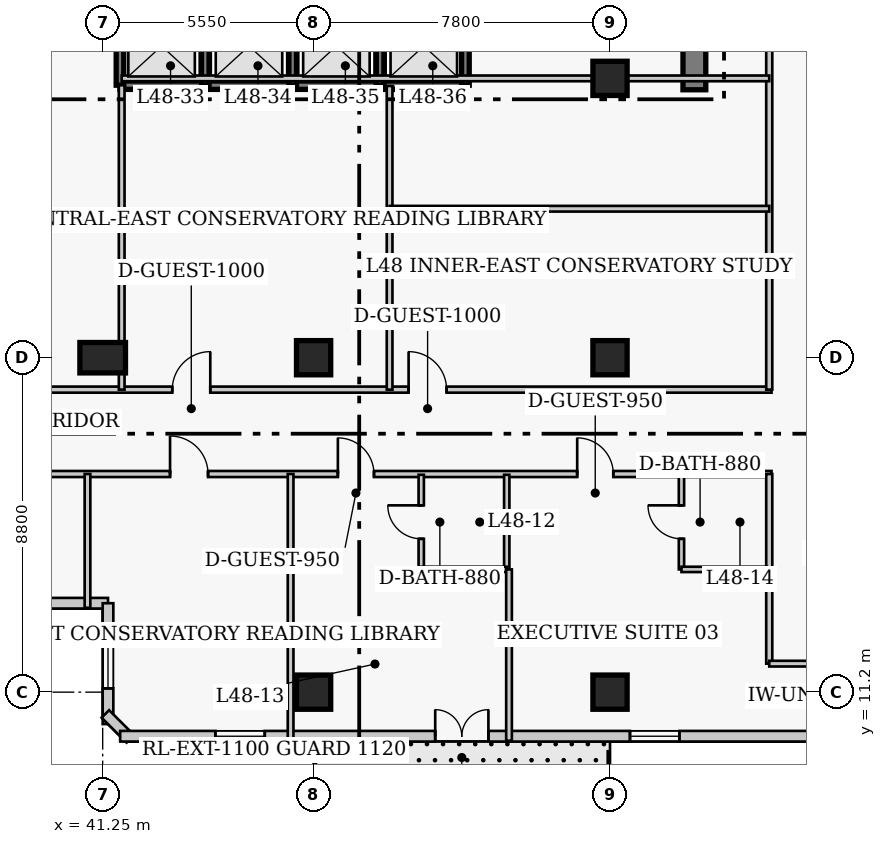
"""IFC4 building model, lengths in metres.
Left out: names, types, materials, properties, quantities, classifications, styles, units other than length and angle.
Written with IfcOpenShell. Run it as: python <this file> out.ifc"""

import sys

from ifc_helpers import new_model, si_unit, direction, frame, frame_2d, origin, origin_2d, place, context, subcontext, project, spatial, rectangle, extrude, element, fill, save


model = new_model("IFC4")
c1 = context("Model", 3, precision=1e-05, world=origin(), true_north=direction((0.0, 1.0)))
c2 = subcontext(c1, "Body", "Model", "MODEL_VIEW")
j1 = project(units=[si_unit("LENGTHUNIT", "METRE"), si_unit("PLANEANGLEUNIT", "RADIAN")], contexts=[c1])
p1 = place(None, origin())
s1 = spatial("IfcSite", under=j1, at=p1, CompositionType="ELEMENT")
p2 = place(p1, origin())
s2 = spatial("IfcBuilding", under=s1, at=p2, CompositionType="ELEMENT")
p3 = place(p2, frame((0.0, 0.0, 192.9)))
s3 = spatial("IfcBuildingStorey", under=s2, at=p3, CompositionType="ELEMENT", Elevation=192.9)
p4 = place(p3, frame((56.82, 27.05, 0.0), z_axis=(0.0, 0.0, 1.0), x_axis=(0.0, 1.0, 0.0)))
e1 = element("IfcWall", 1, at=p4, inside=s3, PredefinedType="SHEAR", context=c2, shape_type="SweptSolid", body=[
    extrude(rectangle(XDim=13.57, YDim=0.6, at=frame_2d((6.785, 0.0))), origin(), (0.0, 0.0, 1.0), 3.9),
])
p5 = place(p3, frame((41.25, 20.0, 0.0), z_axis=(0.0, 0.0, 1.0), x_axis=(1.0, 0.0, 0.0)))
e2 = element("IfcColumn", 2, at=p5, inside=s3, PredefinedType="COLUMN", context=c2, shape_type="SweptSolid", body=[
    extrude(rectangle(XDim=1.2, YDim=0.8, at=origin_2d()), origin(), (0.0, 0.0, 1.0), 3.9),
])
for number, where, z_axis, x_axis in (
    (3, (46.8, 11.2, 0.0), (0.0, 0.0, 1.0), (1.0, 0.0, 0.0)),
    (4, (46.8, 20.0, 0.0), (0.0, 0.0, 1.0), (1.0, 0.0, 0.0)),
    (5, (54.6, 11.2, 0.0), (0.0, 0.0, 1.0), (1.0, 0.0, 0.0)),
    (6, (54.6, 20.0, 0.0), (0.0, 0.0, 1.0), (1.0, 0.0, 0.0)),
    (7, (54.6, 27.35, 0.0), (0.0, 0.0, 1.0), (1.0, 0.0, 0.0)),
):
    element("IfcColumn", number, at=place(p3, frame(where, z_axis=z_axis, x_axis=x_axis)), inside=s3, PredefinedType="COLUMN", context=c2, shape_type="SweptSolid", body=[
        extrude(rectangle(XDim=0.9, YDim=0.9, at=origin_2d()), origin(), (0.0, 0.0, 1.0), 3.9),
    ])
p6 = place(p3, frame((36.61, 13.54, 0.0), z_axis=(0.0, 0.0, 1.0), x_axis=(1.0, 0.0, 0.0)))
e8 = element("IfcWall", 8, at=p6, inside=s3, PredefinedType="SOLIDWALL", context=c2, shape_type="SweptSolid", body=[
    extrude(rectangle(XDim=4.78, YDim=0.28, at=frame_2d((2.39, 0.0))), origin(), (0.0, 0.0, 1.0), 3.65),
])
p7 = place(p6, frame((1.74, 0.0, 0.85)))
e9 = element("IfcOpeningElement", 9, at=p7, cuts=e8, PredefinedType="OPENING", context=c2, shape_type="SweptSolid", body=[
    extrude(rectangle(XDim=1.3, YDim=1.7, at=frame_2d((0.65, 0.85))), frame((0.0, 0.15, 0.0), z_axis=(0.0, -1.0, 0.0), x_axis=(1.0, 0.0, 0.0)), (0.0, 0.0, 1.0), 0.3),
])
p8 = place(p3, frame((41.39, 13.54, 0.0), z_axis=(0.0, 0.0, 1.0), x_axis=(0.0, -1.0, 0.0)))
e10 = element("IfcWall", 10, at=p8, inside=s3, PredefinedType="SOLIDWALL", context=c2, shape_type="SweptSolid", body=[
    extrude(rectangle(XDim=3.18, YDim=0.28, at=frame_2d((1.59, 0.0))), origin(), (0.0, 0.0, 1.0), 3.65),
])
p9 = place(p8, frame((0.94, 0.0, 0.85)))
e11 = element("IfcOpeningElement", 11, at=p9, cuts=e10, PredefinedType="OPENING", context=c2, shape_type="SweptSolid", body=[
    extrude(rectangle(XDim=1.3, YDim=1.7, at=frame_2d((0.65, 0.85))), frame((0.0, 0.15, 0.0), z_axis=(0.0, -1.0, 0.0), x_axis=(1.0, 0.0, 0.0)), (0.0, 0.0, 1.0), 0.3),
])
p10 = place(p3, frame((41.321, 10.627, 0.0), z_axis=(0.0, 0.0, 1.0), x_axis=(0.707106781187, -0.707106781187, 0.0)))
e12 = element("IfcWall", 12, at=p10, inside=s3, PredefinedType="SOLIDWALL", context=c2, shape_type="SweptSolid", body=[
    extrude(rectangle(XDim=0.928, YDim=0.28, at=frame_2d((0.464, 0.0))), origin(), (0.0, 0.0, 1.0), 3.65),
])
p11 = place(p3, frame((41.71, 10.04, 0.0), z_axis=(0.0, 0.0, 1.0), x_axis=(1.0, 0.0, 0.0)))
e13 = element("IfcWall", 13, at=p11, inside=s3, PredefinedType="SOLIDWALL", context=c2, shape_type="SweptSolid", body=[
    extrude(rectangle(XDim=25.83, YDim=0.28, at=frame_2d((12.915, 0.0))), origin(), (0.0, 0.0, 1.0), 3.65),
])
p12 = place(p11, frame((8.29, 0.0, 0.0)))
e14 = element("IfcOpeningElement", 14, at=p12, cuts=e13, PredefinedType="OPENING", context=c2, shape_type="SweptSolid", body=[
    extrude(rectangle(XDim=1.4, YDim=2.15, at=frame_2d((0.7, 1.075))), frame((0.0, 0.15, 0.0), z_axis=(0.0, -1.0, 0.0), x_axis=(1.0, 0.0, 0.0)), (0.0, 0.0, 1.0), 0.3),
])
p13 = place(p11, frame((2.505, 0.0, 0.85)))
e15 = element("IfcOpeningElement", 15, at=p13, cuts=e13, PredefinedType="OPENING", context=c2, shape_type="SweptSolid", body=[
    extrude(rectangle(XDim=1.3, YDim=1.7, at=frame_2d((0.65, 0.85))), frame((0.0, 0.15, 0.0), z_axis=(0.0, -1.0, 0.0), x_axis=(1.0, 0.0, 0.0)), (0.0, 0.0, 1.0), 0.3),
])
p14 = place(p11, frame((13.415, 0.0, 0.85)))
e16 = element("IfcOpeningElement", 16, at=p14, cuts=e13, PredefinedType="OPENING", context=c2, shape_type="SweptSolid", body=[
    extrude(rectangle(XDim=1.3, YDim=1.7, at=frame_2d((0.65, 0.85))), frame((0.0, 0.15, 0.0), z_axis=(0.0, -1.0, 0.0), x_axis=(1.0, 0.0, 0.0)), (0.0, 0.0, 1.0), 0.3),
])
p15 = place(p11, frame((21.525, 0.0, 0.85)))
e17 = element("IfcOpeningElement", 17, at=p15, cuts=e13, PredefinedType="OPENING", context=c2, shape_type="SweptSolid", body=[
    extrude(rectangle(XDim=1.3, YDim=1.7, at=frame_2d((0.65, 0.85))), frame((0.0, 0.15, 0.0), z_axis=(0.0, -1.0, 0.0), x_axis=(1.0, 0.0, 0.0)), (0.0, 0.0, 1.0), 0.3),
])
p16 = place(p3, frame((41.705, 27.17, 0.0), z_axis=(0.0, 0.0, 1.0), x_axis=(1.0, 0.0, 0.0)))
e18 = element("IfcWall", 18, at=p16, inside=s3, PredefinedType="SHEAR", context=c2, shape_type="SweptSolid", body=[
    extrude(rectangle(XDim=2.245, YDim=0.22, at=frame_2d((1.123, 0.0))), origin(), (0.0, 0.0, 1.0), 3.9),
])
p17 = place(p3, frame((41.705, 27.17, 0.0), z_axis=(0.0, 0.0, 1.0), x_axis=(0.0, 1.0, 0.0)))
e19 = element("IfcWall", 19, at=p17, inside=s3, PredefinedType="SHEAR", context=c2, shape_type="SweptSolid", body=[
    extrude(rectangle(XDim=2.06, YDim=0.2, at=frame_2d((1.03, 0.0))), origin(), (0.0, 0.0, 1.0), 3.9),
])
p18 = place(p3, frame((43.95, 27.17, 0.0), z_axis=(0.0, 0.0, 1.0), x_axis=(1.0, 0.0, 0.0)))
e20 = element("IfcWall", 20, at=p18, inside=s3, PredefinedType="SHEAR", context=c2, shape_type="SweptSolid", body=[
    extrude(rectangle(XDim=2.3, YDim=0.22, at=frame_2d((1.15, 0.0))), origin(), (0.0, 0.0, 1.0), 3.9),
])
p19 = place(p3, frame((43.95, 27.17, 0.0), z_axis=(0.0, 0.0, 1.0), x_axis=(0.0, 1.0, 0.0)))
e21 = element("IfcWall", 21, at=p19, inside=s3, PredefinedType="SHEAR", context=c2, shape_type="SweptSolid", body=[
    extrude(rectangle(XDim=2.06, YDim=0.2, at=frame_2d((1.03, 0.0))), origin(), (0.0, 0.0, 1.0), 3.9),
])
p20 = place(p3, frame((46.25, 27.17, 0.0), z_axis=(0.0, 0.0, 1.0), x_axis=(1.0, 0.0, 0.0)))
e22 = element("IfcWall", 22, at=p20, inside=s3, PredefinedType="SHEAR", context=c2, shape_type="SweptSolid", body=[
    extrude(rectangle(XDim=2.3, YDim=0.22, at=frame_2d((1.15, 0.0))), origin(), (0.0, 0.0, 1.0), 3.9),
])
p21 = place(p3, frame((46.25, 27.17, 0.0), z_axis=(0.0, 0.0, 1.0), x_axis=(0.0, 1.0, 0.0)))
e23 = element("IfcWall", 23, at=p21, inside=s3, PredefinedType="SHEAR", context=c2, shape_type="SweptSolid", body=[
    extrude(rectangle(XDim=2.06, YDim=0.2, at=frame_2d((1.03, 0.0))), origin(), (0.0, 0.0, 1.0), 3.9),
])
p22 = place(p3, frame((48.55, 27.17, 0.0), z_axis=(0.0, 0.0, 1.0), x_axis=(1.0, 0.0, 0.0)))
e24 = element("IfcWall", 24, at=p22, inside=s3, PredefinedType="SHEAR", context=c2, shape_type="SweptSolid", body=[
    extrude(rectangle(XDim=2.245, YDim=0.22, at=frame_2d((1.123, 0.0))), origin(), (0.0, 0.0, 1.0), 3.9),
])
for number, where, z_axis, x_axis in (
    (25, (48.55, 27.17, 0.0), (0.0, 0.0, 1.0), (0.0, 1.0, 0.0)),
    (26, (50.795, 27.17, 0.0), (0.0, 0.0, 1.0), (0.0, 1.0, 0.0)),
):
    element("IfcWall", number, at=place(p3, frame(where, z_axis=z_axis, x_axis=x_axis)), inside=s3, PredefinedType="SHEAR", context=c2, shape_type="SweptSolid", body=[
        extrude(rectangle(XDim=2.06, YDim=0.2, at=frame_2d((1.03, 0.0))), origin(), (0.0, 0.0, 1.0), 3.9),
    ])
p23 = place(p3, frame((35.85, 19.16, 0.0), z_axis=(0.0, 0.0, 1.0), x_axis=(1.0, 0.0, 0.0)))
e27 = element("IfcWall", 27, at=p23, inside=s3, PredefinedType="PARTITIONING", context=c2, shape_type="SweptSolid", body=[
    extrude(rectangle(XDim=23.0, YDim=0.16, at=frame_2d((11.5, 0.0))), origin(), (0.0, 0.0, 1.0), 3.65),
])
p24 = place(p23, frame((7.231, 0.0, 0.0)))
e28 = element("IfcOpeningElement", 28, at=p24, cuts=e27, PredefinedType="OPENING", context=c2, shape_type="SweptSolid", body=[
    extrude(rectangle(XDim=1.0, YDim=2.15, at=frame_2d((0.5, 1.075))), frame((0.0, 0.09, 0.0), z_axis=(0.0, -1.0, 0.0), x_axis=(1.0, 0.0, 0.0)), (0.0, 0.0, 1.0), 0.18),
])
p25 = place(p23, frame((13.45, 0.0, 0.0)))
e29 = element("IfcOpeningElement", 29, at=p25, cuts=e27, PredefinedType="OPENING", context=c2, shape_type="SweptSolid", body=[
    extrude(rectangle(XDim=1.0, YDim=2.15, at=frame_2d((0.5, 1.075))), frame((0.0, 0.09, 0.0), z_axis=(0.0, -1.0, 0.0), x_axis=(1.0, 0.0, 0.0)), (0.0, 0.0, 1.0), 0.18),
])
p26 = place(p3, frame((35.8, 16.94, 0.0), z_axis=(0.0, 0.0, 1.0), x_axis=(1.0, 0.0, 0.0)))
e30 = element("IfcWall", 30, at=p26, inside=s3, PredefinedType="PARTITIONING", context=c2, shape_type="SweptSolid", body=[
    extrude(rectangle(XDim=23.05, YDim=0.16, at=frame_2d((11.525, 0.0))), origin(), (0.0, 0.0, 1.0), 3.65),
])
p27 = place(p26, frame((7.222, 0.0, 0.0)))
e31 = element("IfcOpeningElement", 31, at=p27, cuts=e30, PredefinedType="OPENING", context=c2, shape_type="SweptSolid", body=[
    extrude(rectangle(XDim=1.0, YDim=2.15, at=frame_2d((0.5, 1.075))), frame((0.0, 0.09, 0.0), z_axis=(0.0, -1.0, 0.0), x_axis=(1.0, 0.0, 0.0)), (0.0, 0.0, 1.0), 0.18),
])
p28 = place(p26, frame((11.639, 0.0, 0.0)))
e32 = element("IfcOpeningElement", 32, at=p28, cuts=e30, PredefinedType="OPENING", context=c2, shape_type="SweptSolid", body=[
    extrude(rectangle(XDim=0.95, YDim=2.1, at=frame_2d((0.475, 1.05))), frame((0.0, 0.09, 0.0), z_axis=(0.0, -1.0, 0.0), x_axis=(1.0, 0.0, 0.0)), (0.0, 0.0, 1.0), 0.18),
])
p29 = place(p26, frame((17.936, 0.0, 0.0)))
e33 = element("IfcOpeningElement", 33, at=p29, cuts=e30, PredefinedType="OPENING", context=c2, shape_type="SweptSolid", body=[
    extrude(rectangle(XDim=0.95, YDim=2.1, at=frame_2d((0.475, 1.05))), frame((0.0, 0.09, 0.0), z_axis=(0.0, -1.0, 0.0), x_axis=(1.0, 0.0, 0.0)), (0.0, 0.0, 1.0), 0.18),
])
p30 = place(p3, frame((58.79, 19.16, 0.0), z_axis=(0.0, 0.0, 1.0), x_axis=(0.0, 1.0, 0.0)))
e34 = element("IfcWall", 34, at=p30, inside=s3, PredefinedType="PARTITIONING", context=c2, shape_type="SweptSolid", body=[
    extrude(rectangle(XDim=21.49, YDim=0.16, at=frame_2d((10.745, 0.0))), origin(), (0.0, 0.0, 1.0), 3.65),
])
p31 = place(p3, frame((58.79, 11.95, 0.0), z_axis=(0.0, 0.0, 1.0), x_axis=(0.0, 1.0, 0.0)))
e35 = element("IfcWall", 35, at=p31, inside=s3, PredefinedType="PARTITIONING", context=c2, shape_type="SweptSolid", body=[
    extrude(rectangle(XDim=4.99, YDim=0.16, at=frame_2d((2.495, 0.0))), origin(), (0.0, 0.0, 1.0), 3.65),
])
p32 = place(p3, frame((58.79, 11.95, 0.0), z_axis=(0.0, 0.0, 1.0), x_axis=(1.0, 0.0, 0.0)))
e36 = element("IfcWall", 36, at=p32, inside=s3, PredefinedType="PARTITIONING", context=c2, shape_type="SweptSolid", body=[
    extrude(rectangle(XDim=2.22, YDim=0.15, at=frame_2d((1.11, 0.0))), origin(), (0.0, 0.0, 1.0), 3.65),
])
p33 = place(p3, frame((41.75, 19.16, 0.0), z_axis=(0.0, 0.0, 1.0), x_axis=(0.0, 1.0, 0.0)))
e37 = element("IfcWall", 37, at=p33, inside=s3, PredefinedType="PARTITIONING", context=c2, shape_type="SweptSolid", body=[
    extrude(rectangle(XDim=8.01, YDim=0.15, at=frame_2d((4.005, 0.0))), origin(), (0.0, 0.0, 1.0), 3.65),
])
p34 = place(p3, frame((48.8, 19.16, 0.0), z_axis=(0.0, 0.0, 1.0), x_axis=(0.0, 1.0, 0.0)))
e38 = element("IfcWall", 38, at=p34, inside=s3, PredefinedType="PARTITIONING", context=c2, shape_type="SweptSolid", body=[
    extrude(rectangle(XDim=7.99, YDim=0.15, at=frame_2d((3.995, 0.0))), origin(), (0.0, 0.0, 1.0), 3.65),
])
p35 = place(p3, frame((41.75, 27.35, 0.0), z_axis=(0.0, 0.0, 1.0), x_axis=(1.0, 0.0, 0.0)))
e39 = element("IfcWall", 39, at=p35, inside=s3, PredefinedType="PARTITIONING", context=c2, shape_type="SweptSolid", body=[
    extrude(rectangle(XDim=17.04, YDim=0.15, at=frame_2d((8.52, 0.0))), origin(), (0.0, 0.0, 1.0), 3.65),
])
p36 = place(p3, frame((48.8, 23.92, 0.0), z_axis=(0.0, 0.0, 1.0), x_axis=(1.0, 0.0, 0.0)))
e40 = element("IfcWall", 40, at=p36, inside=s3, PredefinedType="PARTITIONING", context=c2, shape_type="SweptSolid", body=[
    extrude(rectangle(XDim=9.99, YDim=0.15, at=frame_2d((4.995, 0.0))), origin(), (0.0, 0.0, 1.0), 3.65),
])
p37 = place(p3, frame((40.85, 13.42, 0.0), z_axis=(0.0, 0.0, 1.0), x_axis=(0.0, 1.0, 0.0)))
e41 = element("IfcWall", 41, at=p37, inside=s3, PredefinedType="PARTITIONING", context=c2, shape_type="SweptSolid", body=[
    extrude(rectangle(XDim=3.52, YDim=0.15, at=frame_2d((1.76, 0.0))), origin(), (0.0, 0.0, 1.0), 3.65),
])
p38 = place(p3, frame((46.195, 9.92, 0.0), z_axis=(0.0, 0.0, 1.0), x_axis=(0.0, 1.0, 0.0)))
e42 = element("IfcWall", 42, at=p38, inside=s3, PredefinedType="PARTITIONING", context=c2, shape_type="SweptSolid", body=[
    extrude(rectangle(XDim=7.02, YDim=0.15, at=frame_2d((3.51, 0.0))), origin(), (0.0, 0.0, 1.0), 3.65),
])
p39 = place(p3, frame((49.633, 14.43, 0.0), z_axis=(0.0, 0.0, 1.0), x_axis=(0.0, 1.0, 0.0)))
e43 = element("IfcWall", 43, at=p39, inside=s3, PredefinedType="PLUMBINGWALL", context=c2, shape_type="SweptSolid", body=[
    extrude(rectangle(XDim=2.49, YDim=0.14, at=frame_2d((1.245, 0.0))), origin(), (0.0, 0.0, 1.0), 3.65),
])
p40 = place(p39, frame((0.805, 0.0, 0.0)))
e44 = element("IfcOpeningElement", 44, at=p40, cuts=e43, PredefinedType="OPENING", context=c2, shape_type="SweptSolid", body=[
    extrude(rectangle(XDim=0.88, YDim=2.05, at=frame_2d((0.44, 1.025))), frame((0.0, 0.08, 0.0), z_axis=(0.0, -1.0, 0.0), x_axis=(1.0, 0.0, 0.0)), (0.0, 0.0, 1.0), 0.16),
])
p41 = place(p3, frame((51.883, 14.43, 0.0), z_axis=(0.0, 0.0, 1.0), x_axis=(0.0, 1.0, 0.0)))
e45 = element("IfcWall", 45, at=p41, inside=s3, PredefinedType="PLUMBINGWALL", context=c2, shape_type="SweptSolid", body=[
    extrude(rectangle(XDim=2.49, YDim=0.14, at=frame_2d((1.245, 0.0))), origin(), (0.0, 0.0, 1.0), 3.65),
])
p42 = place(p3, frame((49.633, 14.43, 0.0), z_axis=(0.0, 0.0, 1.0), x_axis=(1.0, 0.0, 0.0)))
e46 = element("IfcWall", 46, at=p42, inside=s3, PredefinedType="PLUMBINGWALL", context=c2, shape_type="SweptSolid", body=[
    extrude(rectangle(XDim=2.25, YDim=0.14, at=frame_2d((1.125, 0.0))), origin(), (0.0, 0.0, 1.0), 3.65),
])
p43 = place(p3, frame((51.942, 9.92, 0.0), z_axis=(0.0, 0.0, 1.0), x_axis=(0.0, 1.0, 0.0)))
e47 = element("IfcWall", 47, at=p43, inside=s3, PredefinedType="PARTITIONING", context=c2, shape_type="SweptSolid", body=[
    extrude(rectangle(XDim=4.51, YDim=0.15, at=frame_2d((2.255, 0.0))), origin(), (0.0, 0.0, 1.0), 3.65),
])
p44 = place(p3, frame((56.48, 14.43, 0.0), z_axis=(0.0, 0.0, 1.0), x_axis=(0.0, 1.0, 0.0)))
e48 = element("IfcWall", 48, at=p44, inside=s3, PredefinedType="PLUMBINGWALL", context=c2, shape_type="SweptSolid", body=[
    extrude(rectangle(XDim=2.49, YDim=0.14, at=frame_2d((1.245, 0.0))), origin(), (0.0, 0.0, 1.0), 3.65),
])
p45 = place(p44, frame((0.805, 0.0, 0.0)))
e49 = element("IfcOpeningElement", 49, at=p45, cuts=e48, PredefinedType="OPENING", context=c2, shape_type="SweptSolid", body=[
    extrude(rectangle(XDim=0.88, YDim=2.05, at=frame_2d((0.44, 1.025))), frame((0.0, 0.08, 0.0), z_axis=(0.0, -1.0, 0.0), x_axis=(1.0, 0.0, 0.0)), (0.0, 0.0, 1.0), 0.16),
])
p46 = place(p3, frame((56.48, 14.43, 0.0), z_axis=(0.0, 0.0, 1.0), x_axis=(1.0, 0.0, 0.0)))
e50 = element("IfcWall", 50, at=p46, inside=s3, PredefinedType="PLUMBINGWALL", context=c2, shape_type="SweptSolid", body=[
    extrude(rectangle(XDim=2.25, YDim=0.14, at=frame_2d((1.125, 0.0))), origin(), (0.0, 0.0, 1.0), 3.65),
])
p47 = place(p9, origin())
e51 = element("IfcWindow", 51, at=p47, inside=s3, PartitioningType="SINGLE_PANEL", PredefinedType="WINDOW", context=c2, shape_type="SweptSolid", body=[
    extrude(rectangle(XDim=1.3, YDim=1.7, at=frame_2d((0.65, 0.85))), frame((0.0, 0.03, 0.0), z_axis=(0.0, -1.0, 0.0), x_axis=(1.0, 0.0, 0.0)), (0.0, 0.0, 1.0), 0.06),
])
fill(e11, e51)
p48 = place(p12, origin())
e52 = element("IfcDoor", 52, at=p48, inside=s3, OperationType="DOUBLE_DOOR_SINGLE_SWING", PredefinedType="DOOR", context=c2, shape_type="SweptSolid", body=[
    extrude(rectangle(XDim=1.4, YDim=2.15, at=frame_2d((0.7, 1.075))), frame((0.0, 0.025, 0.0), z_axis=(0.0, -1.0, 0.0), x_axis=(1.0, 0.0, 0.0)), (0.0, 0.0, 1.0), 0.05),
])
fill(e14, e52)
p49 = place(p13, origin())
e53 = element("IfcWindow", 53, at=p49, inside=s3, PartitioningType="SINGLE_PANEL", PredefinedType="WINDOW", context=c2, shape_type="SweptSolid", body=[
    extrude(rectangle(XDim=1.3, YDim=1.7, at=frame_2d((0.65, 0.85))), frame((0.0, 0.03, 0.0), z_axis=(0.0, -1.0, 0.0), x_axis=(1.0, 0.0, 0.0)), (0.0, 0.0, 1.0), 0.06),
])
fill(e15, e53)
p50 = place(p14, origin())
e54 = element("IfcWindow", 54, at=p50, inside=s3, PartitioningType="SINGLE_PANEL", PredefinedType="WINDOW", context=c2, shape_type="SweptSolid", body=[
    extrude(rectangle(XDim=1.3, YDim=1.7, at=frame_2d((0.65, 0.85))), frame((0.0, 0.03, 0.0), z_axis=(0.0, -1.0, 0.0), x_axis=(1.0, 0.0, 0.0)), (0.0, 0.0, 1.0), 0.06),
])
fill(e16, e54)
p51 = place(p24, origin())
e55 = element("IfcDoor", 55, at=p51, inside=s3, OperationType="SINGLE_SWING_RIGHT", PredefinedType="DOOR", context=c2, shape_type="SweptSolid", body=[
    extrude(rectangle(XDim=1.0, YDim=2.15, at=frame_2d((0.5, 1.075))), frame((0.0, 0.025, 0.0), z_axis=(0.0, -1.0, 0.0), x_axis=(1.0, 0.0, 0.0)), (0.0, 0.0, 1.0), 0.05),
])
fill(e28, e55)
p52 = place(p25, origin())
e56 = element("IfcDoor", 56, at=p52, inside=s3, OperationType="SINGLE_SWING_LEFT", PredefinedType="DOOR", context=c2, shape_type="SweptSolid", body=[
    extrude(rectangle(XDim=1.0, YDim=2.15, at=frame_2d((0.5, 1.075))), frame((0.0, 0.025, 0.0), z_axis=(0.0, -1.0, 0.0), x_axis=(1.0, 0.0, 0.0)), (0.0, 0.0, 1.0), 0.05),
])
fill(e29, e56)
p53 = place(p27, origin())
e57 = element("IfcDoor", 57, at=p53, inside=s3, OperationType="SINGLE_SWING_LEFT", PredefinedType="DOOR", context=c2, shape_type="SweptSolid", body=[
    extrude(rectangle(XDim=1.0, YDim=2.15, at=frame_2d((0.5, 1.075))), frame((0.0, 0.025, 0.0), z_axis=(0.0, -1.0, 0.0), x_axis=(1.0, 0.0, 0.0)), (0.0, 0.0, 1.0), 0.05),
])
fill(e31, e57)
p54 = place(p40, origin())
e58 = element("IfcDoor", 58, at=p54, inside=s3, OperationType="SINGLE_SWING_RIGHT", PredefinedType="DOOR", context=c2, shape_type="SweptSolid", body=[
    extrude(rectangle(XDim=0.88, YDim=2.05, at=frame_2d((0.44, 1.025))), frame((0.0, 0.025, 0.0), z_axis=(0.0, -1.0, 0.0), x_axis=(1.0, 0.0, 0.0)), (0.0, 0.0, 1.0), 0.05),
])
fill(e44, e58)
p55 = place(p28, origin())
e59 = element("IfcDoor", 59, at=p55, inside=s3, OperationType="SINGLE_SWING_LEFT", PredefinedType="DOOR", context=c2, shape_type="SweptSolid", body=[
    extrude(rectangle(XDim=0.95, YDim=2.1, at=frame_2d((0.475, 1.05))), frame((0.0, 0.025, 0.0), z_axis=(0.0, -1.0, 0.0), x_axis=(1.0, 0.0, 0.0)), (0.0, 0.0, 1.0), 0.05),
])
fill(e32, e59)
p56 = place(p45, origin())
e60 = element("IfcDoor", 60, at=p56, inside=s3, OperationType="SINGLE_SWING_RIGHT", PredefinedType="DOOR", context=c2, shape_type="SweptSolid", body=[
    extrude(rectangle(XDim=0.88, YDim=2.05, at=frame_2d((0.44, 1.025))), frame((0.0, 0.025, 0.0), z_axis=(0.0, -1.0, 0.0), x_axis=(1.0, 0.0, 0.0)), (0.0, 0.0, 1.0), 0.05),
])
fill(e49, e60)
p57 = place(p29, origin())
e61 = element("IfcDoor", 61, at=p57, inside=s3, OperationType="SINGLE_SWING_LEFT", PredefinedType="DOOR", context=c2, shape_type="SweptSolid", body=[
    extrude(rectangle(XDim=0.95, YDim=2.1, at=frame_2d((0.475, 1.05))), frame((0.0, 0.025, 0.0), z_axis=(0.0, -1.0, 0.0), x_axis=(1.0, 0.0, 0.0)), (0.0, 0.0, 1.0), 0.05),
])
fill(e33, e61)
save(model, sys.argv[1])
